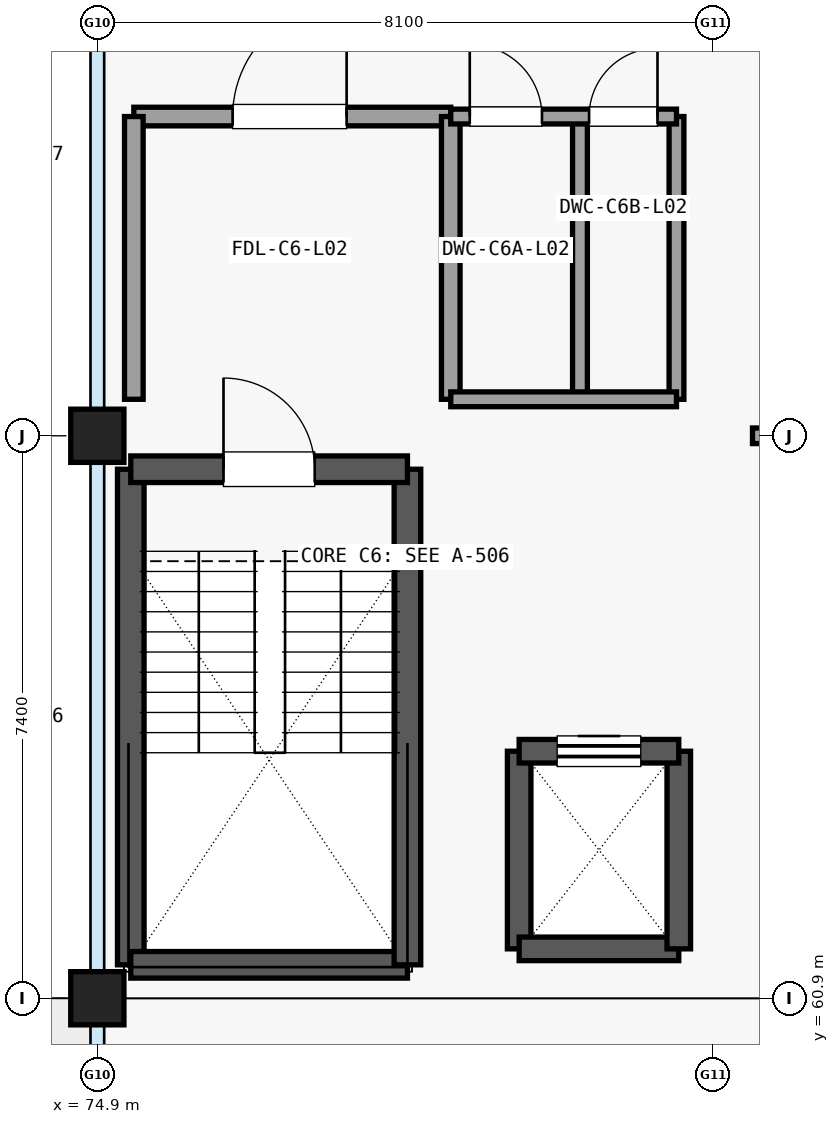
"""IFC4 building model, lengths in metres.
Left out: names, types, materials, properties, quantities, classifications, styles, units other than length and angle.
Written with IfcOpenShell. Run it as: python <this file> out.ifc"""

import sys

from ifc_helpers import new_model, si_unit, direction, frame, frame_2d, origin, origin_2d, place, context, subcontext, project, spatial, rectangle, extrude, element, fill, save


model = new_model("IFC4")
c1 = context("Model", 3, precision=1e-05, world=origin(), true_north=direction((0.0, 1.0)))
c2 = subcontext(c1, "Body", "Model", "MODEL_VIEW")
j1 = project(units=[si_unit("LENGTHUNIT", "METRE"), si_unit("PLANEANGLEUNIT", "RADIAN")], contexts=[c1])
p1 = place(None, origin())
s1 = spatial("IfcSite", under=j1, at=p1, CompositionType="ELEMENT")
p2 = place(p1, origin())
s2 = spatial("IfcBuilding", under=s1, at=p2, CompositionType="ELEMENT")
p3 = place(p2, frame((0.0, 0.0, 10.2)))
s3 = spatial("IfcBuildingStorey", under=s2, at=p3, CompositionType="ELEMENT", Elevation=10.2)
for number, where, z_axis, x_axis in (
    (1, (74.9, 60.9, 0.0), (0.0, 0.0, 1.0), (1.0, 0.0, 0.0)),
    (2, (74.9, 68.3, 0.0), (0.0, 0.0, 1.0), (1.0, 0.0, 0.0)),
):
    element("IfcColumn", number, at=place(p3, frame(where, z_axis=z_axis, x_axis=x_axis)), inside=s3, PredefinedType="COLUMN", context=c2, shape_type="SweptSolid", body=[
        extrude(rectangle(XDim=0.7, YDim=0.7, at=origin_2d()), origin(), (0.0, 0.0, 1.0), 3.37),
    ])
p4 = place(p3, frame((75.34, 61.34, 0.0), z_axis=(0.0, 0.0, 1.0), x_axis=(0.0, 1.0, 0.0)))
e3 = element("IfcWall", 3, at=p4, inside=s3, PredefinedType="SHEAR", context=c2, shape_type="SweptSolid", body=[
    extrude(rectangle(XDim=6.52, YDim=0.35, at=frame_2d((3.26, 0.0))), origin(), (0.0, 0.0, 1.0), 3.365),
])
p5 = place(p3, frame((75.34, 61.34, 0.0), z_axis=(0.0, 0.0, 1.0), x_axis=(1.0, 0.0, 0.0)))
e4 = element("IfcWall", 4, at=p5, inside=s3, PredefinedType="SHEAR", context=c2, shape_type="SweptSolid", body=[
    extrude(rectangle(XDim=3.64, YDim=0.35, at=frame_2d((1.82, 0.0))), origin(), (0.0, 0.0, 1.0), 3.365),
])
p6 = place(p3, frame((78.98, 61.34, 0.0), z_axis=(0.0, 0.0, 1.0), x_axis=(0.0, 1.0, 0.0)))
e5 = element("IfcWall", 5, at=p6, inside=s3, PredefinedType="SHEAR", context=c2, shape_type="SweptSolid", body=[
    extrude(rectangle(XDim=6.52, YDim=0.35, at=frame_2d((3.26, 0.0))), origin(), (0.0, 0.0, 1.0), 3.365),
])
p7 = place(p3, frame((75.34, 67.86, 0.0), z_axis=(0.0, 0.0, 1.0), x_axis=(1.0, 0.0, 0.0)))
e6 = element("IfcWall", 6, at=p7, inside=s3, PredefinedType="SHEAR", context=c2, shape_type="SweptSolid", body=[
    extrude(rectangle(XDim=3.64, YDim=0.35, at=frame_2d((1.82, 0.0))), origin(), (0.0, 0.0, 1.0), 3.365),
])
p8 = place(p7, frame((1.22, 0.0, 0.0)))
e7 = element("IfcOpeningElement", 7, at=p8, cuts=e6, PredefinedType="OPENING", context=c2, shape_type="SweptSolid", body=[
    extrude(rectangle(XDim=1.2, YDim=2.15, at=frame_2d((0.6, 1.075))), frame((0.0, 0.185, 0.0), z_axis=(0.0, -1.0, 0.0), x_axis=(1.0, 0.0, 0.0)), (0.0, 0.0, 1.0), 0.37),
])
p9 = place(p3, frame((80.45, 61.55, 0.0), z_axis=(0.0, 0.0, 1.0), x_axis=(0.0, 1.0, 0.0)))
e8 = element("IfcWall", 8, at=p9, inside=s3, PredefinedType="SHEAR", context=c2, shape_type="SweptSolid", body=[
    extrude(rectangle(XDim=2.6, YDim=0.31, at=frame_2d((1.3, 0.0))), origin(), (0.0, 0.0, 1.0), 3.365),
])
p10 = place(p3, frame((80.45, 61.55, 0.0), z_axis=(0.0, 0.0, 1.0), x_axis=(1.0, 0.0, 0.0)))
e9 = element("IfcWall", 9, at=p10, inside=s3, PredefinedType="SHEAR", context=c2, shape_type="SweptSolid", body=[
    extrude(rectangle(XDim=2.1, YDim=0.31, at=frame_2d((1.05, 0.0))), origin(), (0.0, 0.0, 1.0), 3.365),
])
p11 = place(p3, frame((82.55, 61.55, 0.0), z_axis=(0.0, 0.0, 1.0), x_axis=(0.0, 1.0, 0.0)))
e10 = element("IfcWall", 10, at=p11, inside=s3, PredefinedType="SHEAR", context=c2, shape_type="SweptSolid", body=[
    extrude(rectangle(XDim=2.6, YDim=0.31, at=frame_2d((1.3, 0.0))), origin(), (0.0, 0.0, 1.0), 3.365),
])
p12 = place(p3, frame((80.45, 64.15, 0.0), z_axis=(0.0, 0.0, 1.0), x_axis=(1.0, 0.0, 0.0)))
e11 = element("IfcWall", 11, at=p12, inside=s3, PredefinedType="SHEAR", context=c2, shape_type="SweptSolid", body=[
    extrude(rectangle(XDim=2.1, YDim=0.31, at=frame_2d((1.05, 0.0))), origin(), (0.0, 0.0, 1.0), 3.365),
])
p13 = place(p12, frame((0.5, 0.0, 0.0)))
e12 = element("IfcOpeningElement", 12, at=p13, cuts=e11, PredefinedType="OPENING", context=c2, shape_type="SweptSolid", body=[
    extrude(rectangle(XDim=1.1, YDim=2.15, at=frame_2d((0.55, 1.075))), frame((0.0, 0.165, 0.0), z_axis=(0.0, -1.0, 0.0), x_axis=(1.0, 0.0, 0.0)), (0.0, 0.0, 1.0), 0.33),
])
p14 = place(p3, frame((75.38, 72.5, 0.0), z_axis=(0.0, 0.0, 1.0), x_axis=(1.0, 0.0, 0.0)))
e13 = element("IfcWall", 13, at=p14, inside=s3, PredefinedType="PARTITIONING", context=c2, shape_type="SweptSolid", body=[
    extrude(rectangle(XDim=4.17, YDim=0.245, at=frame_2d((2.085, 0.0))), origin(), (0.0, 0.0, 1.0), 2.514),
])
p15 = place(p14, frame((1.3, 0.0, 0.0)))
e14 = element("IfcOpeningElement", 14, at=p15, cuts=e13, PredefinedType="OPENING", context=c2, shape_type="SweptSolid", body=[
    extrude(rectangle(XDim=1.5, YDim=2.15, at=frame_2d((0.75, 1.075))), frame((0.0, 0.133, 0.0), z_axis=(0.0, -1.0, 0.0), x_axis=(1.0, 0.0, 0.0)), (0.0, 0.0, 1.0), 0.265),
])
for number, where, z_axis, x_axis in (
    (15, (75.38, 68.78, 0.0), (0.0, 0.0, 1.0), (0.0, 1.0, 0.0)),
    (16, (79.55, 68.78, 0.0), (0.0, 0.0, 1.0), (0.0, 1.0, 0.0)),
):
    element("IfcWall", number, at=place(p3, frame(where, z_axis=z_axis, x_axis=x_axis)), inside=s3, PredefinedType="PARTITIONING", context=c2, shape_type="SweptSolid", body=[
        extrude(rectangle(XDim=3.72, YDim=0.245, at=frame_2d((1.86, 0.0))), origin(), (0.0, 0.0, 1.0), 2.514),
    ])
for number, where, z_axis, x_axis in (
    (17, (81.25, 68.78, 0.0), (0.0, 0.0, 1.0), (0.0, 1.0, 0.0)),
    (18, (82.52, 68.78, 0.0), (0.0, 0.0, 1.0), (0.0, 1.0, 0.0)),
):
    element("IfcWall", number, at=place(p3, frame(where, z_axis=z_axis, x_axis=x_axis)), inside=s3, PredefinedType="PARTITIONING", context=c2, shape_type="SweptSolid", body=[
        extrude(rectangle(XDim=3.72, YDim=0.195, at=frame_2d((1.86, 0.0))), origin(), (0.0, 0.0, 1.0), 2.514),
    ])
p16 = place(p3, frame((79.55, 68.78, 0.0), z_axis=(0.0, 0.0, 1.0), x_axis=(1.0, 0.0, 0.0)))
e19 = element("IfcWall", 19, at=p16, inside=s3, PredefinedType="PARTITIONING", context=c2, shape_type="SweptSolid", body=[
    extrude(rectangle(XDim=2.97, YDim=0.195, at=frame_2d((1.485, 0.0))), origin(), (0.0, 0.0, 1.0), 2.514),
])
p17 = place(p3, frame((79.55, 72.5, 0.0), z_axis=(0.0, 0.0, 1.0), x_axis=(1.0, 0.0, 0.0)))
e20 = element("IfcWall", 20, at=p17, inside=s3, PredefinedType="PARTITIONING", context=c2, shape_type="SweptSolid", body=[
    extrude(rectangle(XDim=2.97, YDim=0.195, at=frame_2d((1.485, 0.0))), origin(), (0.0, 0.0, 1.0), 2.514),
])
p18 = place(p17, frame((0.25, 0.0, 0.0)))
e21 = element("IfcOpeningElement", 21, at=p18, cuts=e20, PredefinedType="OPENING", context=c2, shape_type="SweptSolid", body=[
    extrude(rectangle(XDim=0.95, YDim=2.1, at=frame_2d((0.475, 1.05))), frame((0.0, 0.107, 0.0), z_axis=(0.0, -1.0, 0.0), x_axis=(1.0, 0.0, 0.0)), (0.0, 0.0, 1.0), 0.215),
])
p19 = place(p17, frame((1.82, 0.0, 0.0)))
e22 = element("IfcOpeningElement", 22, at=p19, cuts=e20, PredefinedType="OPENING", context=c2, shape_type="SweptSolid", body=[
    extrude(rectangle(XDim=0.9, YDim=2.1, at=frame_2d((0.45, 1.05))), frame((0.0, 0.107, 0.0), z_axis=(0.0, -1.0, 0.0), x_axis=(1.0, 0.0, 0.0)), (0.0, 0.0, 1.0), 0.215),
])
p20 = place(p3, frame((83.52, 68.3, 0.0), z_axis=(0.0, 0.0, 1.0), x_axis=(1.0, 0.0, 0.0)))
e23 = element("IfcWall", 23, at=p20, inside=s3, PredefinedType="PARTITIONING", context=c2, shape_type="SweptSolid", body=[
    extrude(rectangle(XDim=7.06, YDim=0.205, at=frame_2d((3.53, 0.0))), origin(), (0.0, 0.0, 1.0), 2.514),
])
p21 = place(p20, frame((2.705, 0.0, 0.0)))
e24 = element("IfcOpeningElement", 24, at=p21, cuts=e23, PredefinedType="OPENING", context=c2, shape_type="SweptSolid", body=[
    extrude(rectangle(XDim=1.65, YDim=2.25, at=frame_2d((0.825, 1.125))), frame((0.0, 0.113, 0.0), z_axis=(0.0, -1.0, 0.0), x_axis=(1.0, 0.0, 0.0)), (0.0, 0.0, 1.0), 0.225),
])
p22 = place(p8, origin())
e25 = element("IfcDoor", 25, at=p22, inside=s3, OperationType="SINGLE_SWING_LEFT", PredefinedType="DOOR", context=c2, shape_type="SweptSolid", body=[
    extrude(rectangle(XDim=1.2, YDim=2.15, at=frame_2d((0.6, 1.075))), frame((0.0, 0.025, 0.0), z_axis=(0.0, -1.0, 0.0), x_axis=(1.0, 0.0, 0.0)), (0.0, 0.0, 1.0), 0.05),
])
fill(e7, e25)
p23 = place(p13, origin())
e26 = element("IfcDoor", 26, at=p23, inside=s3, OperationType="SLIDING_TO_RIGHT", PredefinedType="DOOR", context=c2, shape_type="SweptSolid", body=[
    extrude(rectangle(XDim=1.1, YDim=2.15, at=frame_2d((0.55, 1.075))), frame((0.0, 0.025, 0.0), z_axis=(0.0, -1.0, 0.0), x_axis=(1.0, 0.0, 0.0)), (0.0, 0.0, 1.0), 0.05),
])
fill(e12, e26)
p24 = place(p15, origin())
e27 = element("IfcDoor", 27, at=p24, inside=s3, OperationType="SINGLE_SWING_RIGHT", PredefinedType="DOOR", context=c2, shape_type="SweptSolid", body=[
    extrude(rectangle(XDim=1.5, YDim=2.15, at=frame_2d((0.75, 1.075))), frame((0.0, 0.025, 0.0), z_axis=(0.0, -1.0, 0.0), x_axis=(1.0, 0.0, 0.0)), (0.0, 0.0, 1.0), 0.05),
])
fill(e14, e27)
p25 = place(p18, origin())
e28 = element("IfcDoor", 28, at=p25, inside=s3, OperationType="SINGLE_SWING_LEFT", PredefinedType="DOOR", context=c2, shape_type="SweptSolid", body=[
    extrude(rectangle(XDim=0.95, YDim=2.1, at=frame_2d((0.475, 1.05))), frame((0.0, 0.025, 0.0), z_axis=(0.0, -1.0, 0.0), x_axis=(1.0, 0.0, 0.0)), (0.0, 0.0, 1.0), 0.05),
])
fill(e21, e28)
p26 = place(p19, origin())
e29 = element("IfcDoor", 29, at=p26, inside=s3, OperationType="SINGLE_SWING_RIGHT", PredefinedType="DOOR", context=c2, shape_type="SweptSolid", body=[
    extrude(rectangle(XDim=0.9, YDim=2.1, at=frame_2d((0.45, 1.05))), frame((0.0, 0.025, 0.0), z_axis=(0.0, -1.0, 0.0), x_axis=(1.0, 0.0, 0.0)), (0.0, 0.0, 1.0), 0.05),
])
fill(e22, e29)
save(model, sys.argv[1])
